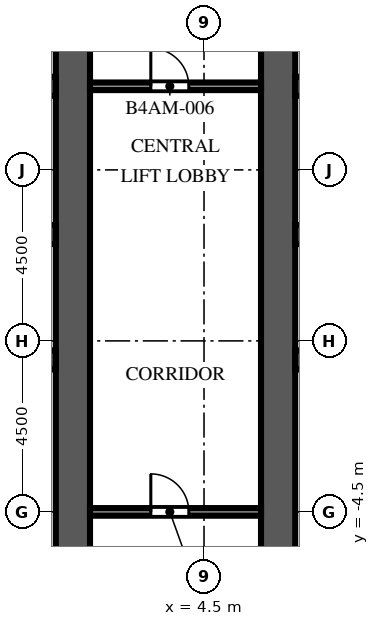
"""IFC4 building model, lengths in metres.
Left out: names, types, materials, properties, quantities, classifications, styles, units other than length and angle.
Written with IfcOpenShell. Run it as: python <this file> out.ifc"""

import sys

from ifc_helpers import new_model, si_unit, direction, frame, frame_2d, origin, place, context, subcontext, project, spatial, rectangle, extrude, element, fill, save


model = new_model("IFC4")
c1 = context("Model", 3, precision=1e-05, world=origin(), true_north=direction((0.0, 1.0)))
c2 = subcontext(c1, "Body", "Model", "MODEL_VIEW")
j1 = project(units=[si_unit("LENGTHUNIT", "METRE"), si_unit("PLANEANGLEUNIT", "RADIAN")], contexts=[c1])
p1 = place(None, origin())
s1 = spatial("IfcSite", under=j1, at=p1, CompositionType="ELEMENT")
p2 = place(p1, origin())
s2 = spatial("IfcBuilding", under=s1, at=p2, CompositionType="ELEMENT")
p3 = place(p2, frame((0.0, 0.0, 145.4)))
s3 = spatial("IfcBuildingStorey", under=s2, at=p3, CompositionType="ELEMENT", Elevation=145.4)
p4 = place(p3, frame((1.05, -9.0, 0.0), z_axis=(0.0, 0.0, 1.0), x_axis=(0.0, 1.0, 0.0)))
e1 = element("IfcWall", 1, at=p4, inside=s3, PredefinedType="SHEAR", context=c2, shape_type="SweptSolid", body=[
    extrude(rectangle(XDim=27.5, YDim=0.9, at=frame_2d((13.75, 0.0))), origin(), (0.0, 0.0, 1.0), 6.0),
])
p5 = place(p4, frame((12.55, 0.0, 0.0)))
e2 = element("IfcOpeningElement", 2, at=p5, cuts=e1, PredefinedType="OPENING", context=c2, shape_type="SweptSolid", body=[
    extrude(rectangle(XDim=2.4, YDim=2.4, at=frame_2d((1.2, 1.2))), frame((0.0, 0.46, 0.0), z_axis=(0.0, -1.0, 0.0), x_axis=(1.0, 0.0, 0.0)), (0.0, 0.0, 1.0), 0.92),
])
p6 = place(p4, frame((5.51, 0.0, 0.0)))
e3 = element("IfcOpeningElement", 3, at=p6, cuts=e1, PredefinedType="OPENING", context=c2, shape_type="SweptSolid", body=[
    extrude(rectangle(XDim=0.923, YDim=2.1, at=frame_2d((0.461, 1.05))), frame((0.0, 0.46, 0.0), z_axis=(0.0, -1.0, 0.0), x_axis=(1.0, 0.0, 0.0)), (0.0, 0.0, 1.0), 0.92),
])
p7 = place(p4, frame((23.427, 0.0, 0.0)))
e4 = element("IfcOpeningElement", 4, at=p7, cuts=e1, PredefinedType="OPENING", context=c2, shape_type="SweptSolid", body=[
    extrude(rectangle(XDim=1.2, YDim=2.1, at=frame_2d((0.6, 1.05))), frame((0.0, 0.46, 0.0), z_axis=(0.0, -1.0, 0.0), x_axis=(1.0, 0.0, 0.0)), (0.0, 0.0, 1.0), 0.92),
])
p8 = place(p3, frame((-9.6, -0.5, 0.0), z_axis=(0.0, 0.0, 1.0), x_axis=(1.0, 0.0, 0.0)))
e5 = element("IfcWall", 5, at=p8, inside=s3, PredefinedType="SHEAR", context=c2, shape_type="SweptSolid", body=[
    extrude(rectangle(XDim=10.2, YDim=0.5, at=frame_2d((5.1, 0.0))), origin(), (0.0, 0.0, 1.0), 6.0),
])
p9 = place(p3, frame((-9.6, 2.8, 0.0), z_axis=(0.0, 0.0, 1.0), x_axis=(1.0, 0.0, 0.0)))
e6 = element("IfcWall", 6, at=p9, inside=s3, PredefinedType="SHEAR", context=c2, shape_type="SweptSolid", body=[
    extrude(rectangle(XDim=10.2, YDim=0.5, at=frame_2d((5.1, 0.0))), origin(), (0.0, 0.0, 1.0), 6.0),
])
p10 = place(p9, frame((0.562, 0.0, 0.0)))
e7 = element("IfcOpeningElement", 7, at=p10, cuts=e6, PredefinedType="OPENING", context=c2, shape_type="SweptSolid", body=[
    extrude(rectangle(XDim=1.1, YDim=2.1, at=frame_2d((0.55, 1.05))), frame((0.0, 0.26, 0.0), z_axis=(0.0, -1.0, 0.0), x_axis=(1.0, 0.0, 0.0)), (0.0, 0.0, 1.0), 0.52),
])
p11 = place(p9, frame((3.238, 0.0, 0.0)))
e8 = element("IfcOpeningElement", 8, at=p11, cuts=e6, PredefinedType="OPENING", context=c2, shape_type="SweptSolid", body=[
    extrude(rectangle(XDim=1.1, YDim=2.1, at=frame_2d((0.55, 1.05))), frame((0.0, 0.26, 0.0), z_axis=(0.0, -1.0, 0.0), x_axis=(1.0, 0.0, 0.0)), (0.0, 0.0, 1.0), 0.52),
])
p12 = place(p9, frame((8.538, 0.0, 0.0)))
e9 = element("IfcOpeningElement", 9, at=p12, cuts=e6, PredefinedType="OPENING", context=c2, shape_type="SweptSolid", body=[
    extrude(rectangle(XDim=1.1, YDim=2.1, at=frame_2d((0.55, 1.05))), frame((0.0, 0.26, 0.0), z_axis=(0.0, -1.0, 0.0), x_axis=(1.0, 0.0, 0.0)), (0.0, 0.0, 1.0), 0.52),
])
p13 = place(p3, frame((-9.6, 6.7, 0.0), z_axis=(0.0, 0.0, 1.0), x_axis=(1.0, 0.0, 0.0)))
e10 = element("IfcWall", 10, at=p13, inside=s3, PredefinedType="SHEAR", context=c2, shape_type="SweptSolid", body=[
    extrude(rectangle(XDim=10.2, YDim=0.5, at=frame_2d((5.1, 0.0))), origin(), (0.0, 0.0, 1.0), 6.0),
])
p14 = place(p13, frame((0.562, 0.0, 0.0)))
e11 = element("IfcOpeningElement", 11, at=p14, cuts=e10, PredefinedType="OPENING", context=c2, shape_type="SweptSolid", body=[
    extrude(rectangle(XDim=1.1, YDim=2.1, at=frame_2d((0.55, 1.05))), frame((0.0, 0.26, 0.0), z_axis=(0.0, -1.0, 0.0), x_axis=(1.0, 0.0, 0.0)), (0.0, 0.0, 1.0), 0.52),
])
p15 = place(p13, frame((3.288, 0.0, 0.0)))
e12 = element("IfcOpeningElement", 12, at=p15, cuts=e10, PredefinedType="OPENING", context=c2, shape_type="SweptSolid", body=[
    extrude(rectangle(XDim=1.0, YDim=2.1, at=frame_2d((0.5, 1.05))), frame((0.0, 0.26, 0.0), z_axis=(0.0, -1.0, 0.0), x_axis=(1.0, 0.0, 0.0)), (0.0, 0.0, 1.0), 0.52),
])
p16 = place(p13, frame((5.913, 0.0, 0.0)))
e13 = element("IfcOpeningElement", 13, at=p16, cuts=e10, PredefinedType="OPENING", context=c2, shape_type="SweptSolid", body=[
    extrude(rectangle(XDim=1.0, YDim=2.1, at=frame_2d((0.5, 1.05))), frame((0.0, 0.26, 0.0), z_axis=(0.0, -1.0, 0.0), x_axis=(1.0, 0.0, 0.0)), (0.0, 0.0, 1.0), 0.52),
])
p17 = place(p13, frame((8.587, 0.0, 0.0)))
e14 = element("IfcOpeningElement", 14, at=p17, cuts=e10, PredefinedType="OPENING", context=c2, shape_type="SweptSolid", body=[
    extrude(rectangle(XDim=1.0, YDim=2.1, at=frame_2d((0.5, 1.05))), frame((0.0, 0.26, 0.0), z_axis=(0.0, -1.0, 0.0), x_axis=(1.0, 0.0, 0.0)), (0.0, 0.0, 1.0), 0.52),
])
p18 = place(p3, frame((6.45, -9.0, 0.0), z_axis=(0.0, 0.0, 1.0), x_axis=(0.0, 1.0, 0.0)))
e15 = element("IfcWall", 15, at=p18, inside=s3, PredefinedType="SHEAR", context=c2, shape_type="SweptSolid", body=[
    extrude(rectangle(XDim=27.5, YDim=0.9, at=frame_2d((13.75, 0.0))), origin(), (0.0, 0.0, 1.0), 6.0),
])
p19 = place(p18, frame((12.55, 0.0, 0.0)))
e16 = element("IfcOpeningElement", 16, at=p19, cuts=e15, PredefinedType="OPENING", context=c2, shape_type="SweptSolid", body=[
    extrude(rectangle(XDim=2.4, YDim=2.4, at=frame_2d((1.2, 1.2))), frame((0.0, 0.46, 0.0), z_axis=(0.0, -1.0, 0.0), x_axis=(1.0, 0.0, 0.0)), (0.0, 0.0, 1.0), 0.92),
])
p20 = place(p18, frame((5.51, 0.0, 0.0)))
e17 = element("IfcOpeningElement", 17, at=p20, cuts=e15, PredefinedType="OPENING", context=c2, shape_type="SweptSolid", body=[
    extrude(rectangle(XDim=0.923, YDim=2.1, at=frame_2d((0.461, 1.05))), frame((0.0, 0.46, 0.0), z_axis=(0.0, -1.0, 0.0), x_axis=(1.0, 0.0, 0.0)), (0.0, 0.0, 1.0), 0.92),
])
p21 = place(p18, frame((23.427, 0.0, 0.0)))
e18 = element("IfcOpeningElement", 18, at=p21, cuts=e15, PredefinedType="OPENING", context=c2, shape_type="SweptSolid", body=[
    extrude(rectangle(XDim=1.2, YDim=2.1, at=frame_2d((0.6, 1.05))), frame((0.0, 0.46, 0.0), z_axis=(0.0, -1.0, 0.0), x_axis=(1.0, 0.0, 0.0)), (0.0, 0.0, 1.0), 0.92),
])
p22 = place(p3, frame((6.9, -0.5, 0.0), z_axis=(0.0, 0.0, 1.0), x_axis=(1.0, 0.0, 0.0)))
e19 = element("IfcWall", 19, at=p22, inside=s3, PredefinedType="SHEAR", context=c2, shape_type="SweptSolid", body=[
    extrude(rectangle(XDim=10.2, YDim=0.5, at=frame_2d((5.1, 0.0))), origin(), (0.0, 0.0, 1.0), 6.0),
])
p23 = place(p3, frame((6.9, 2.8, 0.0), z_axis=(0.0, 0.0, 1.0), x_axis=(1.0, 0.0, 0.0)))
e20 = element("IfcWall", 20, at=p23, inside=s3, PredefinedType="SHEAR", context=c2, shape_type="SweptSolid", body=[
    extrude(rectangle(XDim=10.2, YDim=0.5, at=frame_2d((5.1, 0.0))), origin(), (0.0, 0.0, 1.0), 6.0),
])
p24 = place(p23, frame((0.562, 0.0, 0.0)))
e21 = element("IfcOpeningElement", 21, at=p24, cuts=e20, PredefinedType="OPENING", context=c2, shape_type="SweptSolid", body=[
    extrude(rectangle(XDim=1.1, YDim=2.1, at=frame_2d((0.55, 1.05))), frame((0.0, 0.26, 0.0), z_axis=(0.0, -1.0, 0.0), x_axis=(1.0, 0.0, 0.0)), (0.0, 0.0, 1.0), 0.52),
])
p25 = place(p23, frame((3.238, 0.0, 0.0)))
e22 = element("IfcOpeningElement", 22, at=p25, cuts=e20, PredefinedType="OPENING", context=c2, shape_type="SweptSolid", body=[
    extrude(rectangle(XDim=1.1, YDim=2.1, at=frame_2d((0.55, 1.05))), frame((0.0, 0.26, 0.0), z_axis=(0.0, -1.0, 0.0), x_axis=(1.0, 0.0, 0.0)), (0.0, 0.0, 1.0), 0.52),
])
p26 = place(p23, frame((8.538, 0.0, 0.0)))
e23 = element("IfcOpeningElement", 23, at=p26, cuts=e20, PredefinedType="OPENING", context=c2, shape_type="SweptSolid", body=[
    extrude(rectangle(XDim=1.1, YDim=2.1, at=frame_2d((0.55, 1.05))), frame((0.0, 0.26, 0.0), z_axis=(0.0, -1.0, 0.0), x_axis=(1.0, 0.0, 0.0)), (0.0, 0.0, 1.0), 0.52),
])
p27 = place(p3, frame((6.9, 6.7, 0.0), z_axis=(0.0, 0.0, 1.0), x_axis=(1.0, 0.0, 0.0)))
e24 = element("IfcWall", 24, at=p27, inside=s3, PredefinedType="SHEAR", context=c2, shape_type="SweptSolid", body=[
    extrude(rectangle(XDim=10.2, YDim=0.5, at=frame_2d((5.1, 0.0))), origin(), (0.0, 0.0, 1.0), 6.0),
])
p28 = place(p27, frame((0.562, 0.0, 0.0)))
e25 = element("IfcOpeningElement", 25, at=p28, cuts=e24, PredefinedType="OPENING", context=c2, shape_type="SweptSolid", body=[
    extrude(rectangle(XDim=1.1, YDim=2.1, at=frame_2d((0.55, 1.05))), frame((0.0, 0.26, 0.0), z_axis=(0.0, -1.0, 0.0), x_axis=(1.0, 0.0, 0.0)), (0.0, 0.0, 1.0), 0.52),
])
p29 = place(p27, frame((3.288, 0.0, 0.0)))
e26 = element("IfcOpeningElement", 26, at=p29, cuts=e24, PredefinedType="OPENING", context=c2, shape_type="SweptSolid", body=[
    extrude(rectangle(XDim=1.0, YDim=2.1, at=frame_2d((0.5, 1.05))), frame((0.0, 0.26, 0.0), z_axis=(0.0, -1.0, 0.0), x_axis=(1.0, 0.0, 0.0)), (0.0, 0.0, 1.0), 0.52),
])
p30 = place(p27, frame((5.913, 0.0, 0.0)))
e27 = element("IfcOpeningElement", 27, at=p30, cuts=e24, PredefinedType="OPENING", context=c2, shape_type="SweptSolid", body=[
    extrude(rectangle(XDim=1.0, YDim=2.1, at=frame_2d((0.5, 1.05))), frame((0.0, 0.26, 0.0), z_axis=(0.0, -1.0, 0.0), x_axis=(1.0, 0.0, 0.0)), (0.0, 0.0, 1.0), 0.52),
])
p31 = place(p27, frame((8.587, 0.0, 0.0)))
e28 = element("IfcOpeningElement", 28, at=p31, cuts=e24, PredefinedType="OPENING", context=c2, shape_type="SweptSolid", body=[
    extrude(rectangle(XDim=1.0, YDim=2.1, at=frame_2d((0.5, 1.05))), frame((0.0, 0.26, 0.0), z_axis=(0.0, -1.0, 0.0), x_axis=(1.0, 0.0, 0.0)), (0.0, 0.0, 1.0), 0.52),
])
p32 = place(p3, frame((-1.825, -3.69, 0.0), z_axis=(0.0, 0.0, 1.0), x_axis=(1.0, 0.0, 0.0)))
e29 = element("IfcWall", 29, at=p32, inside=s3, PredefinedType="PARTITIONING", context=c2, shape_type="SweptSolid", body=[
    extrude(rectangle(XDim=2.425, YDim=0.1, at=frame_2d((1.212, 0.0))), origin(), (0.0, 0.0, 1.0), 5.4),
])
p33 = place(p32, frame((0.712, 0.0, 0.0)))
e30 = element("IfcOpeningElement", 30, at=p33, cuts=e29, PredefinedType="OPENING", context=c2, shape_type="SweptSolid", body=[
    extrude(rectangle(XDim=1.0, YDim=2.1, at=frame_2d((0.5, 1.05))), frame((0.0, 0.06, 0.0), z_axis=(0.0, -1.0, 0.0), x_axis=(1.0, 0.0, 0.0)), (0.0, 0.0, 1.0), 0.12),
])
p34 = place(p3, frame((-1.825, -2.367, 0.0), z_axis=(0.0, 0.0, 1.0), x_axis=(1.0, 0.0, 0.0)))
e31 = element("IfcWall", 31, at=p34, inside=s3, PredefinedType="PARTITIONING", context=c2, shape_type="SweptSolid", body=[
    extrude(rectangle(XDim=2.425, YDim=0.1, at=frame_2d((1.212, 0.0))), origin(), (0.0, 0.0, 1.0), 5.4),
])
p35 = place(p34, frame((0.712, 0.0, 0.0)))
e32 = element("IfcOpeningElement", 32, at=p35, cuts=e31, PredefinedType="OPENING", context=c2, shape_type="SweptSolid", body=[
    extrude(rectangle(XDim=1.0, YDim=2.1, at=frame_2d((0.5, 1.05))), frame((0.0, 0.06, 0.0), z_axis=(0.0, -1.0, 0.0), x_axis=(1.0, 0.0, 0.0)), (0.0, 0.0, 1.0), 0.12),
])
p36 = place(p3, frame((6.9, -3.69, 0.0), z_axis=(0.0, 0.0, 1.0), x_axis=(1.0, 0.0, 0.0)))
e33 = element("IfcWall", 33, at=p36, inside=s3, PredefinedType="PARTITIONING", context=c2, shape_type="SweptSolid", body=[
    extrude(rectangle(XDim=2.425, YDim=0.1, at=frame_2d((1.212, 0.0))), origin(), (0.0, 0.0, 1.0), 5.4),
])
p37 = place(p36, frame((0.712, 0.0, 0.0)))
e34 = element("IfcOpeningElement", 34, at=p37, cuts=e33, PredefinedType="OPENING", context=c2, shape_type="SweptSolid", body=[
    extrude(rectangle(XDim=1.0, YDim=2.1, at=frame_2d((0.5, 1.05))), frame((0.0, 0.06, 0.0), z_axis=(0.0, -1.0, 0.0), x_axis=(1.0, 0.0, 0.0)), (0.0, 0.0, 1.0), 0.12),
])
p38 = place(p3, frame((6.9, -2.367, 0.0), z_axis=(0.0, 0.0, 1.0), x_axis=(1.0, 0.0, 0.0)))
e35 = element("IfcWall", 35, at=p38, inside=s3, PredefinedType="PARTITIONING", context=c2, shape_type="SweptSolid", body=[
    extrude(rectangle(XDim=2.425, YDim=0.1, at=frame_2d((1.212, 0.0))), origin(), (0.0, 0.0, 1.0), 5.4),
])
p39 = place(p38, frame((0.712, 0.0, 0.0)))
e36 = element("IfcOpeningElement", 36, at=p39, cuts=e35, PredefinedType="OPENING", context=c2, shape_type="SweptSolid", body=[
    extrude(rectangle(XDim=1.0, YDim=2.1, at=frame_2d((0.5, 1.05))), frame((0.0, 0.06, 0.0), z_axis=(0.0, -1.0, 0.0), x_axis=(1.0, 0.0, 0.0)), (0.0, 0.0, 1.0), 0.12),
])
p40 = place(p3, frame((6.0, -4.5, 0.0), z_axis=(0.0, 0.0, 1.0), x_axis=(-1.0, 0.0, 0.0)))
e37 = element("IfcWall", 37, at=p40, inside=s3, PredefinedType="PARTITIONING", context=c2, shape_type="SweptSolid", body=[
    extrude(rectangle(XDim=4.5, YDim=0.2, at=frame_2d((2.25, 0.0))), origin(), (0.0, 0.0, 1.0), 5.4),
])
p41 = place(p40, frame((1.9, 0.0, 0.0)))
e38 = element("IfcOpeningElement", 38, at=p41, cuts=e37, PredefinedType="OPENING", context=c2, shape_type="SweptSolid", body=[
    extrude(rectangle(XDim=1.0, YDim=2.1, at=frame_2d((0.5, 1.05))), frame((0.0, 0.11, 0.0), z_axis=(0.0, -1.0, 0.0), x_axis=(1.0, 0.0, 0.0)), (0.0, 0.0, 1.0), 0.22),
])
p42 = place(p3, frame((1.5, 6.7, 0.0), z_axis=(0.0, 0.0, 1.0), x_axis=(1.0, 0.0, 0.0)))
e39 = element("IfcWall", 39, at=p42, inside=s3, PredefinedType="PARTITIONING", context=c2, shape_type="SweptSolid", body=[
    extrude(rectangle(XDim=4.5, YDim=0.2, at=frame_2d((2.25, 0.0))), origin(), (0.0, 0.0, 1.0), 5.4),
])
p43 = place(p42, frame((1.6, 0.0, 0.0)))
e40 = element("IfcOpeningElement", 40, at=p43, cuts=e39, PredefinedType="OPENING", context=c2, shape_type="SweptSolid", body=[
    extrude(rectangle(XDim=1.0, YDim=2.1, at=frame_2d((0.5, 1.05))), frame((0.0, 0.11, 0.0), z_axis=(0.0, -1.0, 0.0), x_axis=(1.0, 0.0, 0.0)), (0.0, 0.0, 1.0), 0.22),
])
p44 = place(p5, origin())
e41 = element("IfcDoor", 41, at=p44, inside=s3, OperationType="DOUBLE_DOOR_DOUBLE_SWING", PredefinedType="DOOR", context=c2, shape_type="SweptSolid", body=[
    extrude(rectangle(XDim=2.4, YDim=2.4, at=frame_2d((1.2, 1.2))), frame((0.0, 0.025, 0.0), z_axis=(0.0, -1.0, 0.0), x_axis=(1.0, 0.0, 0.0)), (0.0, 0.0, 1.0), 0.05),
])
fill(e2, e41)
p45 = place(p19, origin())
e42 = element("IfcDoor", 42, at=p45, inside=s3, OperationType="DOUBLE_DOOR_DOUBLE_SWING", PredefinedType="DOOR", context=c2, shape_type="SweptSolid", body=[
    extrude(rectangle(XDim=2.4, YDim=2.4, at=frame_2d((1.2, 1.2))), frame((0.0, 0.025, 0.0), z_axis=(0.0, -1.0, 0.0), x_axis=(1.0, 0.0, 0.0)), (0.0, 0.0, 1.0), 0.05),
])
fill(e16, e42)
p46 = place(p6, origin())
e43 = element("IfcDoor", 43, at=p46, inside=s3, OperationType="SINGLE_SWING_LEFT", PredefinedType="DOOR", context=c2, shape_type="SweptSolid", body=[
    extrude(rectangle(XDim=0.923, YDim=2.1, at=frame_2d((0.461, 1.05))), frame((0.0, 0.425, 0.0), z_axis=(0.0, -1.0, 0.0), x_axis=(1.0, 0.0, 0.0)), (0.0, 0.0, 1.0), 0.05),
])
fill(e3, e43)
p47 = place(p20, origin())
e44 = element("IfcDoor", 44, at=p47, inside=s3, OperationType="SINGLE_SWING_RIGHT", PredefinedType="DOOR", context=c2, shape_type="SweptSolid", body=[
    extrude(rectangle(XDim=0.923, YDim=2.1, at=frame_2d((0.461, 1.05))), frame((0.0, -0.375, 0.0), z_axis=(0.0, -1.0, 0.0), x_axis=(1.0, 0.0, 0.0)), (0.0, 0.0, 1.0), 0.05),
])
fill(e17, e44)
p48 = place(p41, origin())
e45 = element("IfcDoor", 45, at=p48, inside=s3, OperationType="SINGLE_SWING_RIGHT", PredefinedType="DOOR", context=c2, shape_type="SweptSolid", body=[
    extrude(rectangle(XDim=1.0, YDim=2.1, at=frame_2d((0.5, 1.05))), frame((0.0, 0.025, 0.0), z_axis=(0.0, -1.0, 0.0), x_axis=(1.0, 0.0, 0.0)), (0.0, 0.0, 1.0), 0.05),
])
fill(e38, e45)
p49 = place(p43, origin())
e46 = element("IfcDoor", 46, at=p49, inside=s3, OperationType="SINGLE_SWING_LEFT", PredefinedType="DOOR", context=c2, shape_type="SweptSolid", body=[
    extrude(rectangle(XDim=1.0, YDim=2.1, at=frame_2d((0.5, 1.05))), frame((0.0, 0.025, 0.0), z_axis=(0.0, -1.0, 0.0), x_axis=(1.0, 0.0, 0.0)), (0.0, 0.0, 1.0), 0.05),
])
fill(e40, e46)
save(model, sys.argv[1])
